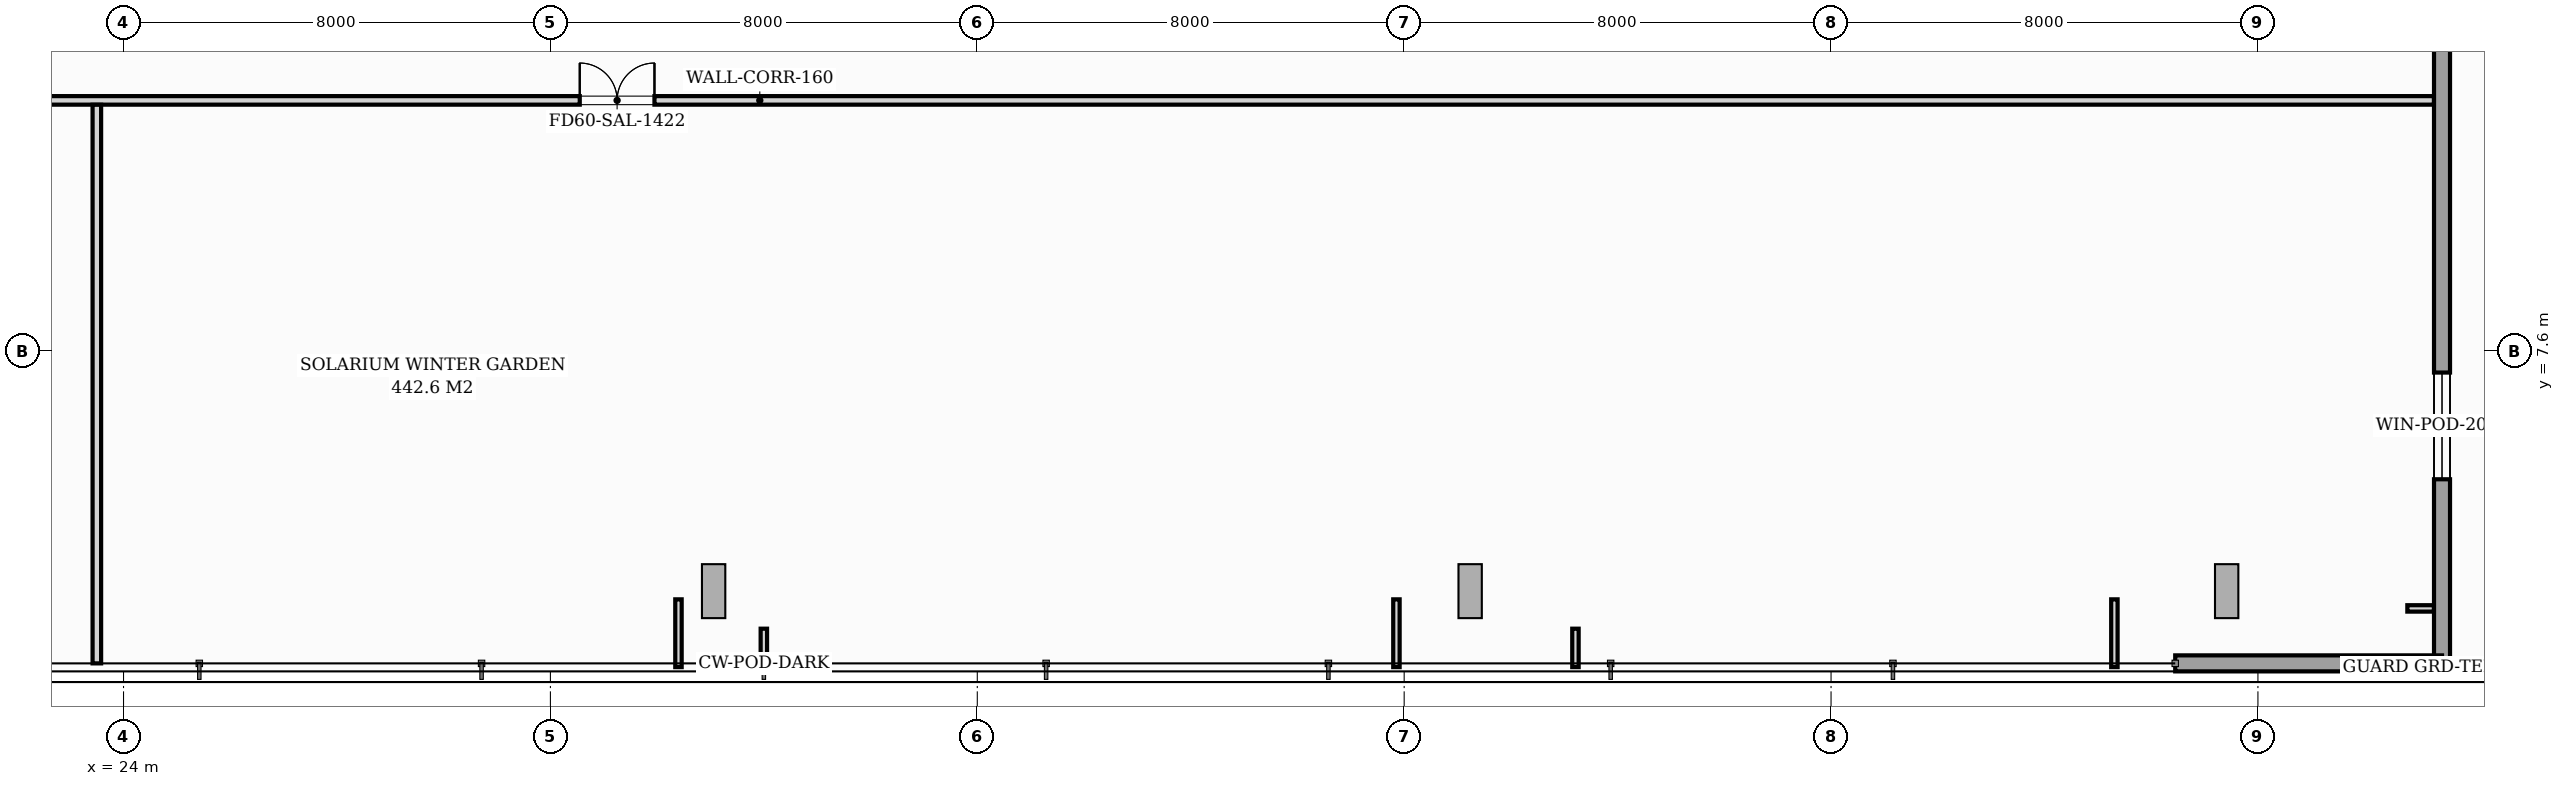
"""IFC4 building model, lengths in metres.
Left out: names, types, materials, properties, quantities, classifications, styles, units other than length and angle.
Written with IfcOpenShell. Run it as: python <this file> out.ifc"""

import sys

from ifc_helpers import new_model, si_unit, direction, frame, frame_2d, origin, origin_2d, place, context, subcontext, project, spatial, rectangle, i_section, extrude, source, transform, mapped, element, fill, save


model = new_model("IFC4")
c1 = context("Model", 3, precision=1e-05, world=origin(), true_north=direction((0.0, 1.0)))
c2 = subcontext(c1, "Body", "Model", "MODEL_VIEW")
j1 = project(units=[si_unit("LENGTHUNIT", "METRE"), si_unit("PLANEANGLEUNIT", "RADIAN")], contexts=[c1])
p1 = place(None, origin())
s1 = spatial("IfcSite", under=j1, at=p1, CompositionType="ELEMENT")
p2 = place(p1, origin())
s2 = spatial("IfcBuilding", under=s1, at=p2, CompositionType="ELEMENT")
p3 = place(p2, frame((0.0, 0.0, 18.5)))
s3 = spatial("IfcBuildingStorey", under=s2, at=p3, CompositionType="ELEMENT", Elevation=18.5)
m1 = source(origin(), c2, "Body", "SweptSolid", [
    extrude(i_section(OverallWidth=0.438, OverallDepth=1.011, WebThickness=0.041, FlangeThickness=0.074, FilletRadius=0.024, at=origin_2d()), origin(), (0.0, 0.0, 1.0), 4.907),
])
p4 = place(p3, frame((35.881, 2.821, 0.152), z_axis=(-0.603693235311, 0.207533543598, 0.76973002145), x_axis=(0.727918178879, -0.250238747557, 0.638369559173)))
e1 = element("IfcColumn", 1, at=p4, inside=s3, PredefinedType="COLUMN", context=c2, shape_type="MappedRepresentation", body=[
    mapped(m1, transform((0.0, 0.0, 0.0), scale=1.0)),
])
m2 = source(origin(), c2, "Body", "SweptSolid", [
    extrude(i_section(OverallWidth=0.438, OverallDepth=1.011, WebThickness=0.041, FlangeThickness=0.074, FilletRadius=0.024, at=origin_2d()), origin(), (0.0, 0.0, 1.0), 7.154),
])
p5 = place(p3, frame((50.882, 2.834, 0.199), z_axis=(-0.846170500382, 0.138719272627, 0.514541006806), x_axis=(0.507763032383, -0.083241519868, 0.857465773262)))
e2 = element("IfcColumn", 2, at=p5, inside=s3, PredefinedType="COLUMN", context=c2, shape_type="MappedRepresentation", body=[
    mapped(m2, transform((0.0, 0.0, 0.0), scale=1.0)),
])
m3 = source(origin(), c2, "Body", "SweptSolid", [
    extrude(i_section(OverallWidth=0.438, OverallDepth=1.011, WebThickness=0.041, FlangeThickness=0.074, FilletRadius=0.024, at=origin_2d()), origin(), (0.0, 0.0, 1.0), 9.892),
])
p6 = place(p3, frame((65.881, 2.838, 0.215), z_axis=(-0.924122217882, 0.099485542685, 0.368918355755), x_axis=(0.366798987691, -0.039487413721, 0.92946180491)))
e3 = element("IfcColumn", 3, at=p6, inside=s3, PredefinedType="COLUMN", context=c2, shape_type="MappedRepresentation", body=[
    mapped(m3, transform((0.0, 0.0, 0.0), scale=1.0)),
])
p7 = place(p3, frame((67.45, 31.05, 0.0), z_axis=(0.0, 0.0, 1.0), x_axis=(0.0, -1.0, 0.0)))
e4 = element("IfcWall", 4, at=p7, inside=s3, PredefinedType="STANDARD", context=c2, shape_type="SweptSolid", body=[
    extrude(rectangle(XDim=29.3, YDim=0.3, at=frame_2d((14.65, 0.0))), origin(), (0.0, 0.0, 1.0), 4.08),
])
p8 = place(p7, frame((6.05, 0.0, 0.0)))
e5 = element("IfcOpeningElement", 5, at=p8, cuts=e4, PredefinedType="OPENING", context=c2, shape_type="SweptSolid", body=[
    extrude(rectangle(XDim=1.6, YDim=2.1, at=frame_2d((0.8, 1.05))), frame((0.0, 0.16, 0.0), z_axis=(0.0, -1.0, 0.0), x_axis=(1.0, 0.0, 0.0)), (0.0, 0.0, 1.0), 0.32),
])
p9 = place(p7, frame((23.85, 0.0, 0.9)))
e6 = element("IfcOpeningElement", 6, at=p9, cuts=e4, PredefinedType="OPENING", context=c2, shape_type="SweptSolid", body=[
    extrude(rectangle(XDim=2.0, YDim=2.4, at=frame_2d((1.0, 1.2))), frame((0.0, 0.16, 0.0), z_axis=(0.0, -1.0, 0.0), x_axis=(1.0, 0.0, 0.0)), (0.0, 0.0, 1.0), 0.32),
])
p10 = place(p3, frame((67.45, 1.75, 0.0), z_axis=(0.0, 0.0, 1.0), x_axis=(-1.0, 0.0, 0.0)))
e7 = element("IfcWall", 7, at=p10, inside=s3, PredefinedType="STANDARD", context=c2, shape_type="SweptSolid", body=[
    extrude(rectangle(XDim=5.0, YDim=0.3, at=frame_2d((2.5, 0.0))), origin(), (0.0, 0.0, 1.0), 4.08),
])
p11 = place(p3, frame((4.55, 12.3, 0.0), z_axis=(0.0, 0.0, 1.0), x_axis=(1.0, 0.0, 0.0)))
e8 = element("IfcWall", 8, at=p11, inside=s3, PredefinedType="PARTITIONING", context=c2, shape_type="SweptSolid", body=[
    extrude(rectangle(XDim=62.748, YDim=0.16, at=frame_2d((31.374, 0.0))), origin(), (0.0, 0.0, 1.0), 4.08),
])
p12 = place(p11, frame((6.5, 0.0, 0.0)))
e9 = element("IfcOpeningElement", 9, at=p12, cuts=e8, PredefinedType="OPENING", context=c2, shape_type="SweptSolid", body=[
    extrude(rectangle(XDim=1.4, YDim=2.08, at=frame_2d((0.7, 1.04))), frame((0.0, 0.09, 0.0), z_axis=(0.0, -1.0, 0.0), x_axis=(1.0, 0.0, 0.0)), (0.0, 0.0, 1.0), 0.18),
])
p13 = place(p11, frame((28.0, 0.0, 0.0)))
e10 = element("IfcOpeningElement", 10, at=p13, cuts=e8, PredefinedType="OPENING", context=c2, shape_type="SweptSolid", body=[
    extrude(rectangle(XDim=1.4, YDim=2.08, at=frame_2d((0.7, 1.04))), frame((0.0, 0.09, 0.0), z_axis=(0.0, -1.0, 0.0), x_axis=(1.0, 0.0, 0.0)), (0.0, 0.0, 1.0), 0.18),
])
p14 = place(p3, frame((23.5, 1.75, 0.0), z_axis=(0.0, 0.0, 1.0), x_axis=(0.0, 1.0, 0.0)))
e11 = element("IfcWall", 11, at=p14, inside=s3, PredefinedType="PARTITIONING", context=c2, shape_type="SweptSolid", body=[
    extrude(rectangle(XDim=10.468, YDim=0.16, at=frame_2d((5.234, 0.0))), origin(), (0.0, 0.0, 1.0), 4.08),
])
for number, where, z_axis, x_axis in (
    (12, (34.4, 2.95, 0.0), (0.0, 0.0, 1.0), (0.0, -1.0, 0.0)),
    (13, (47.855, 2.95, 0.0), (0.0, 0.0, 1.0), (0.0, -1.0, 0.0)),
    (14, (61.31, 2.95, 0.0), (0.0, 0.0, 1.0), (0.0, -1.0, 0.0)),
):
    element("IfcWall", number, at=place(p3, frame(where, z_axis=z_axis, x_axis=x_axis)), inside=s3, PredefinedType="PARTITIONING", context=c2, shape_type="SweptSolid", body=[
        extrude(rectangle(XDim=1.27, YDim=0.12, at=frame_2d((0.635, 0.0))), origin(), (0.0, 0.0, 1.0), 4.08),
    ])
for number, where, z_axis, x_axis in (
    (15, (36.0, 2.4, 0.0), (0.0, 0.0, 1.0), (0.0, -1.0, 0.0)),
    (16, (51.21, 2.4, 0.0), (0.0, 0.0, 1.0), (0.0, -1.0, 0.0)),
):
    element("IfcWall", number, at=place(p3, frame(where, z_axis=z_axis, x_axis=x_axis)), inside=s3, PredefinedType="PARTITIONING", context=c2, shape_type="SweptSolid", body=[
        extrude(rectangle(XDim=0.72, YDim=0.12, at=frame_2d((0.36, 0.0))), origin(), (0.0, 0.0, 1.0), 4.08),
    ])
p15 = place(p3, frame((66.8, 2.78, 0.0), z_axis=(0.0, 0.0, 1.0), x_axis=(1.0, 0.0, 0.0)))
e17 = element("IfcWall", 17, at=p15, inside=s3, PredefinedType="PARTITIONING", context=c2, shape_type="SweptSolid", body=[
    extrude(rectangle(XDim=0.498, YDim=0.12, at=frame_2d((0.249, 0.0))), origin(), (0.0, 0.0, 1.0), 4.08),
])
m4 = source(origin(), c2, "Body", "SweptSolid", [
    extrude(rectangle(XDim=2.0, YDim=2.4, at=frame_2d((1.0, 1.2))), frame((0.0, 0.03, 0.0), z_axis=(0.0, -1.0, 0.0), x_axis=(1.0, 0.0, 0.0)), (0.0, 0.0, 1.0), 0.06),
])
p16 = place(p9, origin())
e18 = element("IfcWindow", 18, at=p16, inside=s3, PartitioningType="SINGLE_PANEL", PredefinedType="WINDOW", context=c2, shape_type="MappedRepresentation", body=[
    mapped(m4, transform((0.0, 0.0, 0.0), scale=1.0)),
])
fill(e6, e18)
m5 = source(origin(), c2, "Body", "SweptSolid", [
    extrude(rectangle(XDim=1.4, YDim=2.08, at=frame_2d((0.7, 1.04))), frame((0.0, 0.025, 0.0), z_axis=(0.0, -1.0, 0.0), x_axis=(1.0, 0.0, 0.0)), (0.0, 0.0, 1.0), 0.05),
])
p17 = place(p13, origin())
e19 = element("IfcDoor", 19, at=p17, inside=s3, OperationType="DOUBLE_DOOR_SINGLE_SWING", PredefinedType="DOOR", context=c2, shape_type="MappedRepresentation", body=[
    mapped(m5, transform((0.0, 0.0, 0.0), scale=1.0)),
])
fill(e10, e19)
save(model, sys.argv[1])
